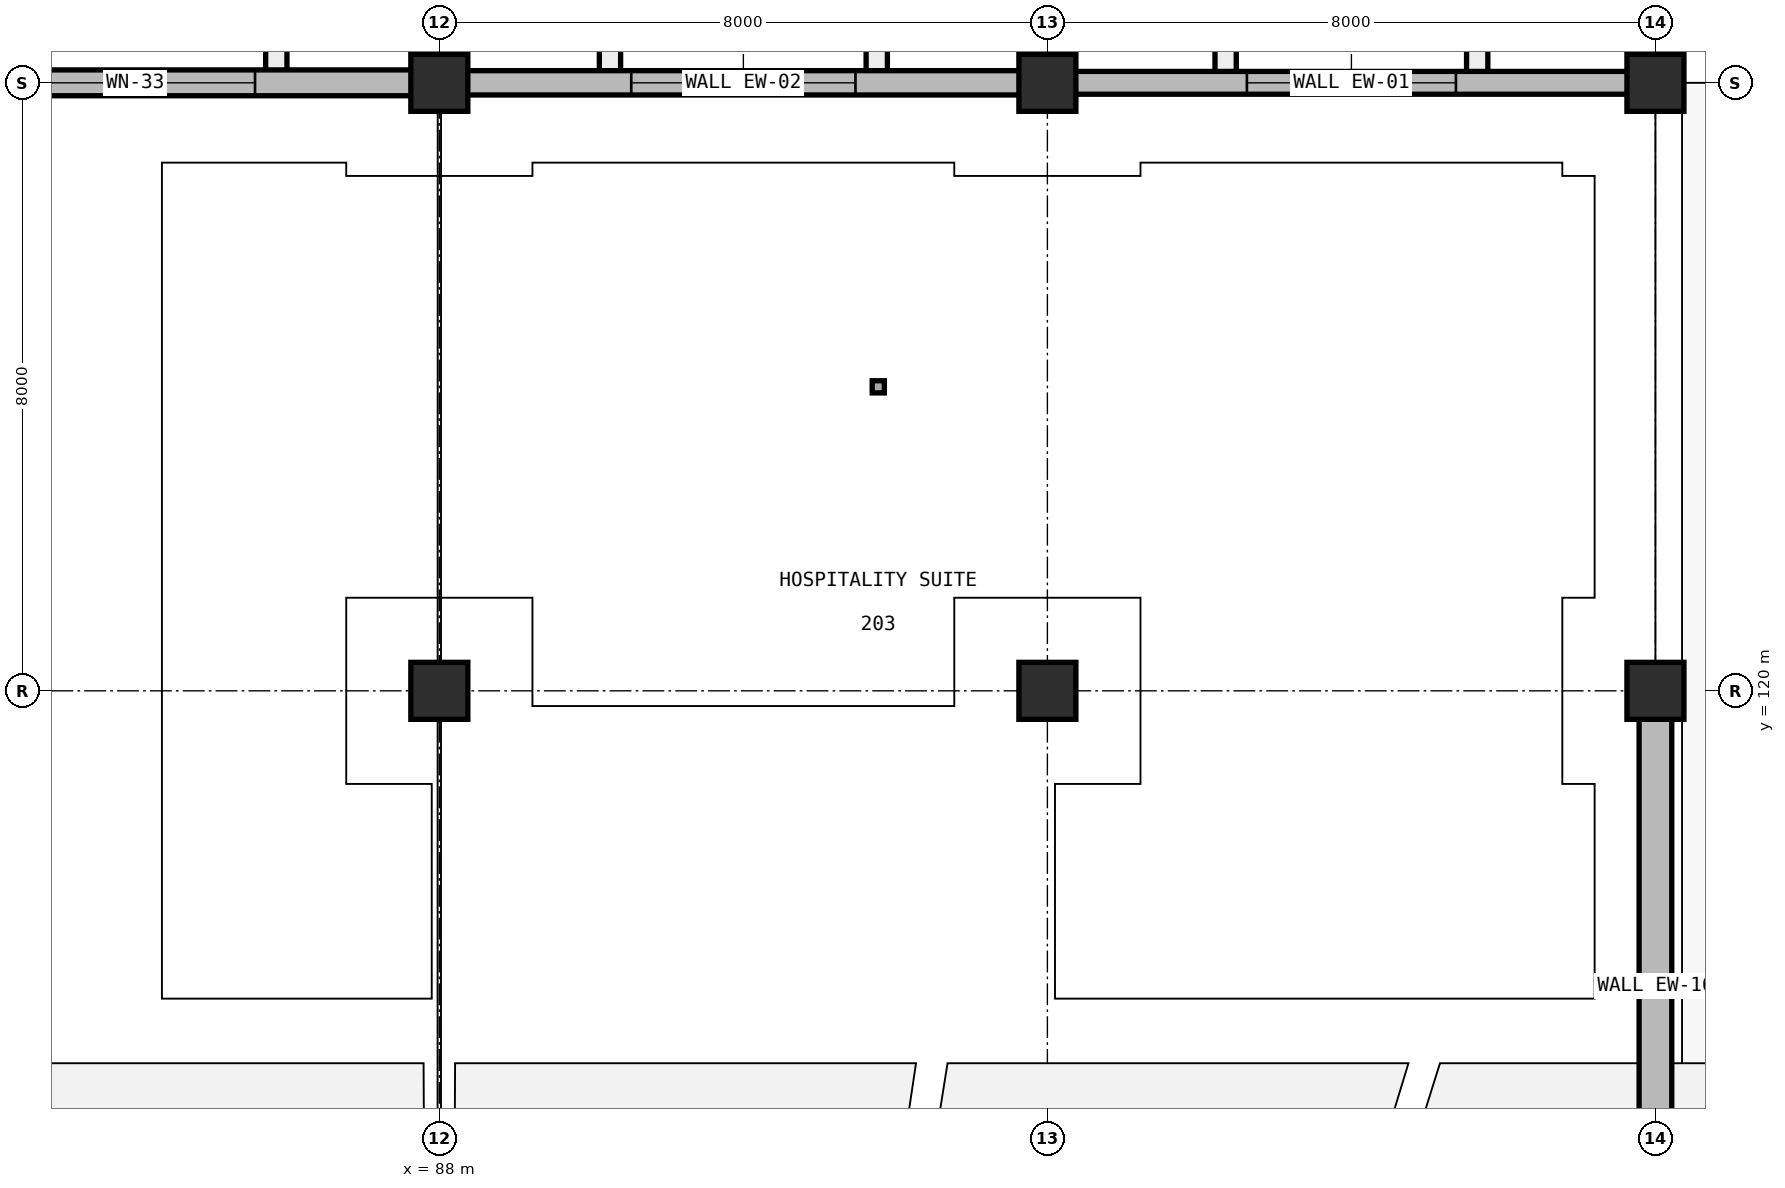
"""IFC4 building model, lengths in metres.
Left out: names, types, materials, properties, quantities, classifications, styles, units other than length and angle.
Written with IfcOpenShell. Run it as: python <this file> out.ifc"""

import sys

from ifc_helpers import new_model, si_unit, direction, frame, frame_2d, origin, origin_2d, place, context, subcontext, project, spatial, rectangle, extrude, element, fill, save


model = new_model("IFC4")
c1 = context("Model", 3, precision=1e-05, world=origin(), true_north=direction((0.0, 1.0)))
c2 = subcontext(c1, "Body", "Model", "MODEL_VIEW")
j1 = project(units=[si_unit("LENGTHUNIT", "METRE"), si_unit("PLANEANGLEUNIT", "RADIAN")], contexts=[c1])
p1 = place(None, origin())
s1 = spatial("IfcSite", under=j1, at=p1, CompositionType="ELEMENT")
p2 = place(p1, origin())
s2 = spatial("IfcBuilding", under=s1, at=p2, CompositionType="ELEMENT")
p3 = place(p2, frame((0.0, 0.0, 10.2)))
s3 = spatial("IfcBuildingStorey", under=s2, at=p3, CompositionType="ELEMENT", Elevation=10.2)
for number, where, z_axis, x_axis in (
    (1, (88.0, 120.0, 0.0), (0.0, 0.0, 1.0), (1.0, 0.0, 0.0)),
    (2, (88.0, 128.0, 0.0), (0.0, 0.0, 1.0), (1.0, 0.0, 0.0)),
    (3, (96.0, 120.0, 0.0), (0.0, 0.0, 1.0), (1.0, 0.0, 0.0)),
    (4, (96.0, 128.0, 0.0), (0.0, 0.0, 1.0), (1.0, 0.0, 0.0)),
    (5, (104.0, 120.0, 0.0), (0.0, 0.0, 1.0), (1.0, 0.0, 0.0)),
    (6, (104.0, 128.0, 0.0), (0.0, 0.0, 1.0), (1.0, 0.0, 0.0)),
):
    element("IfcColumn", number, at=place(p3, frame(where, z_axis=z_axis, x_axis=x_axis)), inside=s3, PredefinedType="COLUMN", context=c2, shape_type="SweptSolid", body=[
        extrude(rectangle(XDim=0.75, YDim=0.75, at=origin_2d()), origin(), (0.0, 0.0, 1.0), 4.8),
    ])
p4 = place(p3, frame((104.0, 119.645, 0.0), z_axis=(0.0, 0.0, 1.0), x_axis=(0.0, -1.0, 0.0)))
e7 = element("IfcWall", 7, at=p4, inside=s3, PredefinedType="SOLIDWALL", context=c2, shape_type="SweptSolid", body=[
    extrude(rectangle(XDim=7.065, YDim=0.43, at=frame_2d((3.532, 0.0))), origin(), (0.0, 0.0, 1.0), 3.6),
])
p5 = place(p3, frame((96.355, 128.0, 0.0), z_axis=(0.0, 0.0, 1.0), x_axis=(1.0, 0.0, 0.0)))
e8 = element("IfcWall", 8, at=p5, inside=s3, PredefinedType="SOLIDWALL", context=c2, shape_type="SweptSolid", body=[
    extrude(rectangle(XDim=7.29, YDim=0.3, at=frame_2d((3.645, 0.0))), origin(), (0.0, 0.0, 1.0), 3.6),
])
p6 = place(p5, frame((2.27, 0.0, 0.95)))
e9 = element("IfcOpeningElement", 9, at=p6, cuts=e8, PredefinedType="OPENING", context=c2, shape_type="SweptSolid", body=[
    extrude(rectangle(XDim=2.75, YDim=1.65, at=frame_2d((1.375, 0.825))), frame((0.0, 0.16, 0.0), z_axis=(0.0, -1.0, 0.0), x_axis=(1.0, 0.0, 0.0)), (0.0, 0.0, 1.0), 0.32),
])
p7 = place(p3, frame((88.355, 128.0, 0.0), z_axis=(0.0, 0.0, 1.0), x_axis=(1.0, 0.0, 0.0)))
e10 = element("IfcWall", 10, at=p7, inside=s3, PredefinedType="SOLIDWALL", context=c2, shape_type="SweptSolid", body=[
    extrude(rectangle(XDim=7.29, YDim=0.32, at=frame_2d((3.645, 0.0))), origin(), (0.0, 0.0, 1.0), 3.6),
])
p8 = place(p7, frame((2.17, 0.0, 0.95)))
e11 = element("IfcOpeningElement", 11, at=p8, cuts=e10, PredefinedType="OPENING", context=c2, shape_type="SweptSolid", body=[
    extrude(rectangle(XDim=2.95, YDim=1.65, at=frame_2d((1.475, 0.825))), frame((0.0, 0.17, 0.0), z_axis=(0.0, -1.0, 0.0), x_axis=(1.0, 0.0, 0.0)), (0.0, 0.0, 1.0), 0.34),
])
p9 = place(p3, frame((80.355, 128.0, 0.0), z_axis=(0.0, 0.0, 1.0), x_axis=(1.0, 0.0, 0.0)))
e12 = element("IfcWall", 12, at=p9, inside=s3, PredefinedType="SOLIDWALL", context=c2, shape_type="SweptSolid", body=[
    extrude(rectangle(XDim=7.29, YDim=0.34, at=frame_2d((3.645, 0.0))), origin(), (0.0, 0.0, 1.0), 3.6),
])
p10 = place(p9, frame((2.07, 0.0, 0.95)))
e13 = element("IfcOpeningElement", 13, at=p10, cuts=e12, PredefinedType="OPENING", context=c2, shape_type="SweptSolid", body=[
    extrude(rectangle(XDim=3.15, YDim=1.55, at=frame_2d((1.575, 0.775))), frame((0.0, 0.18, 0.0), z_axis=(0.0, -1.0, 0.0), x_axis=(1.0, 0.0, 0.0)), (0.0, 0.0, 1.0), 0.36),
])
p11 = place(p6, origin())
e14 = element("IfcWindow", 14, at=p11, inside=s3, PartitioningType="SINGLE_PANEL", PredefinedType="WINDOW", context=c2, shape_type="SweptSolid", body=[
    extrude(rectangle(XDim=2.75, YDim=1.65, at=frame_2d((1.375, 0.825))), frame((0.0, 0.03, 0.0), z_axis=(0.0, -1.0, 0.0), x_axis=(1.0, 0.0, 0.0)), (0.0, 0.0, 1.0), 0.06),
])
fill(e9, e14)
p12 = place(p8, origin())
e15 = element("IfcWindow", 15, at=p12, inside=s3, PartitioningType="SINGLE_PANEL", PredefinedType="WINDOW", context=c2, shape_type="SweptSolid", body=[
    extrude(rectangle(XDim=2.95, YDim=1.65, at=frame_2d((1.475, 0.825))), frame((0.0, 0.03, 0.0), z_axis=(0.0, -1.0, 0.0), x_axis=(1.0, 0.0, 0.0)), (0.0, 0.0, 1.0), 0.06),
])
fill(e11, e15)
p13 = place(p10, origin())
e16 = element("IfcWindow", 16, at=p13, inside=s3, PartitioningType="SINGLE_PANEL", PredefinedType="WINDOW", context=c2, shape_type="SweptSolid", body=[
    extrude(rectangle(XDim=3.15, YDim=1.55, at=frame_2d((1.575, 0.775))), frame((0.0, 0.03, 0.0), z_axis=(0.0, -1.0, 0.0), x_axis=(1.0, 0.0, 0.0)), (0.0, 0.0, 1.0), 0.06),
])
fill(e13, e16)
save(model, sys.argv[1])
